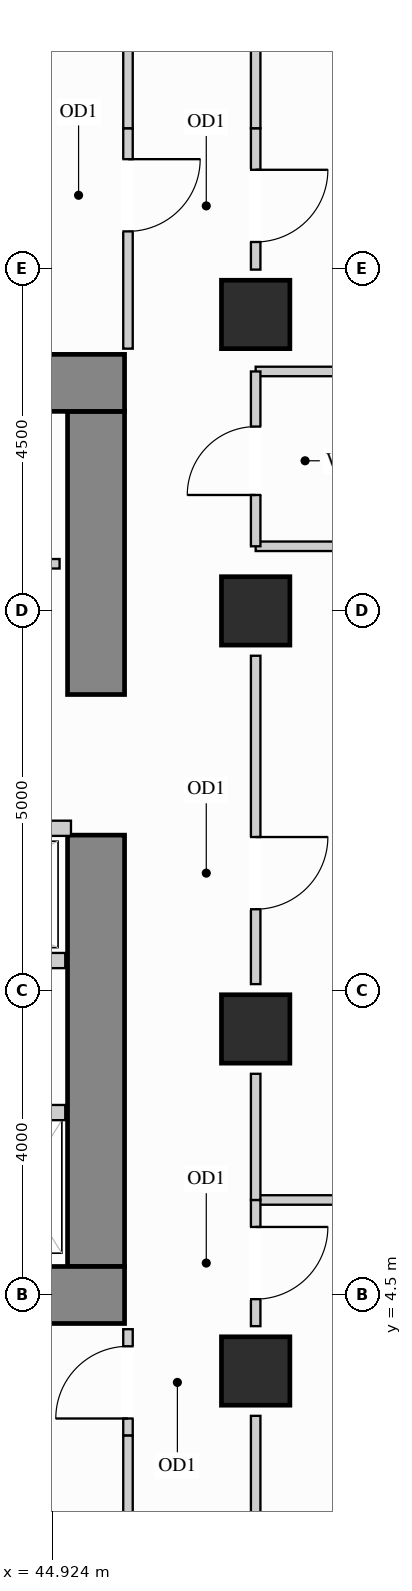
"""IFC4 building model, lengths in metres.
Left out: names, types, materials, properties, quantities, classifications, styles, units other than length and angle.
Written with IfcOpenShell. Run it as: python <this file> out.ifc"""

import sys

from ifc_helpers import new_model, si_unit, direction, frame, frame_2d, origin, origin_2d, place, context, subcontext, project, spatial, rectangle, extrude, source, transform, mapped, element, fill, save


model = new_model("IFC4")
c1 = context("Model", 3, precision=1e-05, world=origin(), true_north=direction((0.0, 1.0)))
c2 = subcontext(c1, "Body", "Model", "MODEL_VIEW")
j1 = project(units=[si_unit("LENGTHUNIT", "METRE"), si_unit("PLANEANGLEUNIT", "RADIAN")], contexts=[c1])
p1 = place(None, origin())
s1 = spatial("IfcSite", under=j1, at=p1, CompositionType="ELEMENT")
p2 = place(p1, origin())
s2 = spatial("IfcBuilding", under=s1, at=p2, CompositionType="ELEMENT")
p3 = place(p2, frame((0.0, 0.0, 117.0)))
s3 = spatial("IfcBuildingStorey", under=s2, at=p3, CompositionType="ELEMENT", Elevation=117.0)
m1 = source(origin(), c2, "Body", "SweptSolid", [
    extrude(rectangle(XDim=0.9, YDim=0.9, at=origin_2d()), origin(), (0.0, 0.0, 1.0), 3.38),
])
for number, where, z_axis, x_axis in (
    (1, (47.6, 13.5, 0.0), (0.0, 0.0, 1.0), (1.0, 0.0, 0.0)),
    (2, (47.6, 3.5, 0.0), (0.0, 0.0, 1.0), (1.0, 0.0, 0.0)),
    (3, (47.6, 8.0, 0.0), (0.0, 0.0, 1.0), (1.0, 0.0, 0.0)),
    (4, (47.6, 17.4, 0.0), (0.0, 0.0, 1.0), (1.0, 0.0, 0.0)),
):
    element("IfcColumn", number, at=place(p3, frame(where, z_axis=z_axis, x_axis=x_axis)), inside=s3, PredefinedType="COLUMN", context=c2, shape_type="MappedRepresentation", body=[
        mapped(m1, transform((0.0, 0.0, 0.0), x_axis=(1.0, 0.0, 0.0), y_axis=(0.0, 1.0, 0.0), z_axis=(0.0, 0.0, 1.0))),
    ])
m2 = source(origin(), c2, "Body", "SweptSolid", [
    extrude(rectangle(XDim=5.675, YDim=0.75, at=frame_2d((2.837, 0.0))), origin(), (0.0, 0.0, 1.0), 3.38),
])
p4 = place(p3, frame((45.5, 4.875, 0.0), z_axis=(0.0, 0.0, 1.0), x_axis=(0.0, 1.0, 0.0)))
e5 = element("IfcWall", 5, at=p4, inside=s3, PredefinedType="SHEAR", context=c2, shape_type="MappedRepresentation", body=[
    mapped(m2, transform((0.0, 0.0, 0.0), x_axis=(1.0, 0.0, 0.0), y_axis=(0.0, 1.0, 0.0), z_axis=(0.0, 0.0, 1.0))),
])
m3 = source(origin(), c2, "Body", "SweptSolid", [
    extrude(rectangle(XDim=3.725, YDim=0.75, at=frame_2d((1.863, 0.0))), origin(), (0.0, 0.0, 1.0), 3.38),
])
p5 = place(p3, frame((45.5, 12.4, 0.0), z_axis=(0.0, 0.0, 1.0), x_axis=(0.0, 1.0, 0.0)))
e6 = element("IfcWall", 6, at=p5, inside=s3, PredefinedType="SHEAR", context=c2, shape_type="MappedRepresentation", body=[
    mapped(m3, transform((0.0, 0.0, 0.0), x_axis=(1.0, 0.0, 0.0), y_axis=(0.0, 1.0, 0.0), z_axis=(0.0, 0.0, 1.0))),
])
m4 = source(origin(), c2, "Body", "SweptSolid", [
    extrude(rectangle(XDim=10.25, YDim=0.75, at=frame_2d((5.125, 0.0))), origin(), (0.0, 0.0, 1.0), 3.38),
])
for number, where, z_axis, x_axis in (
    (7, (35.625, 16.5, 0.0), (0.0, 0.0, 1.0), (1.0, 0.0, 0.0)),
    (8, (35.625, 4.5, 0.0), (0.0, 0.0, 1.0), (1.0, 0.0, 0.0)),
):
    element("IfcWall", number, at=place(p3, frame(where, z_axis=z_axis, x_axis=x_axis)), inside=s3, PredefinedType="SHEAR", context=c2, shape_type="MappedRepresentation", body=[
        mapped(m4, transform((0.0, 0.0, 0.0), x_axis=(1.0, 0.0, 0.0), y_axis=(0.0, 1.0, 0.0), z_axis=(0.0, 0.0, 1.0))),
    ])
p6 = place(p3, frame((40.75, 14.12, 0.0), z_axis=(0.0, 0.0, 1.0), x_axis=(1.0, 0.0, 0.0)))
e9 = element("IfcWall", 9, at=p6, inside=s3, PredefinedType="PARTITIONING", context=c2, shape_type="SweptSolid", body=[
    extrude(rectangle(XDim=4.27, YDim=0.125, at=frame_2d((2.135, 0.0))), origin(), (0.0, 0.0, 1.0), 3.365),
])
p7 = place(p6, frame((1.66, 0.0, 0.0)))
e10 = element("IfcOpeningElement", 10, at=p7, cuts=e9, PredefinedType="OPENING", context=c2, shape_type="SweptSolid", body=[
    extrude(rectangle(XDim=0.95, YDim=2.15, at=frame_2d((0.475, 1.075))), frame((0.0, 0.073, 0.0), z_axis=(0.0, -1.0, 0.0), x_axis=(1.0, 0.0, 0.0)), (0.0, 0.0, 1.0), 0.145),
])
m5 = source(origin(), c2, "Body", "SweptSolid", [
    extrude(rectangle(XDim=8.048, YDim=0.125, at=frame_2d((4.024, 0.0))), origin(), (0.0, 0.0, 1.0), 3.365),
])
p8 = place(p3, frame((47.6, 14.35, 0.0), z_axis=(0.0, 0.0, 1.0), x_axis=(1.0, 0.0, 0.0)))
e11 = element("IfcWall", 11, at=p8, inside=s3, PredefinedType="PARTITIONING", context=c2, shape_type="MappedRepresentation", body=[
    mapped(m5, transform((0.0, 0.0, 0.0), x_axis=(1.0, 0.0, 0.0), y_axis=(0.0, 1.0, 0.0), z_axis=(0.0, 0.0, 1.0))),
])
m6 = source(origin(), c2, "Body", "SweptSolid", [
    extrude(rectangle(XDim=8.048, YDim=0.125, at=frame_2d((4.024, 0.0))), origin(), (0.0, 0.0, 1.0), 2.677),
])
p9 = place(p3, frame((47.6, 16.65, 0.0), z_axis=(0.0, 0.0, 1.0), x_axis=(1.0, 0.0, 0.0)))
e12 = element("IfcWall", 12, at=p9, inside=s3, PredefinedType="PARTITIONING", context=c2, shape_type="MappedRepresentation", body=[
    mapped(m6, transform((0.0, 0.0, 0.0), x_axis=(1.0, 0.0, 0.0), y_axis=(0.0, 1.0, 0.0), z_axis=(0.0, 0.0, 1.0))),
])
p10 = place(p3, frame((47.6, 5.75, 0.0), z_axis=(0.0, 0.0, 1.0), x_axis=(1.0, 0.0, 0.0)))
e13 = element("IfcWall", 13, at=p10, inside=s3, PredefinedType="PARTITIONING", context=c2, shape_type="MappedRepresentation", body=[
    mapped(m5, transform((0.0, 0.0, 0.0), x_axis=(1.0, 0.0, 0.0), y_axis=(0.0, 1.0, 0.0), z_axis=(0.0, 0.0, 1.0))),
])
p11 = place(p3, frame((47.6, 4.09, 0.0), z_axis=(0.0, 0.0, 1.0), x_axis=(0.0, 1.0, 0.0)))
e14 = element("IfcWall", 14, at=p11, inside=s3, PredefinedType="PARTITIONING", context=c2, shape_type="SweptSolid", body=[
    extrude(rectangle(XDim=1.66, YDim=0.125, at=frame_2d((0.83, 0.0))), origin(), (0.0, 0.0, 1.0), 2.677),
])
p12 = place(p11, frame((0.355, 0.0, 0.0)))
e15 = element("IfcOpeningElement", 15, at=p12, cuts=e14, PredefinedType="OPENING", context=c2, shape_type="SweptSolid", body=[
    extrude(rectangle(XDim=0.95, YDim=2.15, at=frame_2d((0.475, 1.075))), frame((0.0, 0.073, 0.0), z_axis=(0.0, -1.0, 0.0), x_axis=(1.0, 0.0, 0.0)), (0.0, 0.0, 1.0), 0.145),
])
m7 = source(origin(), c2, "Body", "SweptSolid", [
    extrude(rectangle(XDim=1.72, YDim=0.125, at=frame_2d((0.86, 0.0))), origin(), (0.0, 0.0, 1.0), 2.677),
])
p13 = place(p3, frame((47.6, 1.19, 0.0), z_axis=(0.0, 0.0, 1.0), x_axis=(0.0, 1.0, 0.0)))
e16 = element("IfcWall", 16, at=p13, inside=s3, PredefinedType="PARTITIONING", context=c2, shape_type="MappedRepresentation", body=[
    mapped(m7, transform((0.0, 0.0, 0.0), x_axis=(1.0, 0.0, 0.0), y_axis=(0.0, 1.0, 0.0), z_axis=(0.0, 0.0, 1.0))),
])
m8 = source(origin(), c2, "Body", "SweptSolid", [
    extrude(rectangle(XDim=1.66, YDim=0.125, at=frame_2d((0.83, 0.0))), origin(), (0.0, 0.0, 1.0), 2.677),
])
p14 = place(p3, frame((47.6, 5.75, 0.0), z_axis=(0.0, 0.0, 1.0), x_axis=(0.0, 1.0, 0.0)))
e17 = element("IfcWall", 17, at=p14, inside=s3, PredefinedType="PARTITIONING", context=c2, shape_type="MappedRepresentation", body=[
    mapped(m8, transform((0.0, 0.0, 0.0), x_axis=(1.0, 0.0, 0.0), y_axis=(0.0, 1.0, 0.0), z_axis=(0.0, 0.0, 1.0))),
])
p15 = place(p3, frame((47.6, 8.59, 0.0), z_axis=(0.0, 0.0, 1.0), x_axis=(0.0, 1.0, 0.0)))
e18 = element("IfcWall", 18, at=p15, inside=s3, PredefinedType="PARTITIONING", context=c2, shape_type="SweptSolid", body=[
    extrude(rectangle(XDim=4.32, YDim=0.125, at=frame_2d((2.16, 0.0))), origin(), (0.0, 0.0, 1.0), 2.677),
])
p16 = place(p15, frame((0.985, 0.0, 0.0)))
e19 = element("IfcOpeningElement", 19, at=p16, cuts=e18, PredefinedType="OPENING", context=c2, shape_type="SweptSolid", body=[
    extrude(rectangle(XDim=0.95, YDim=2.15, at=frame_2d((0.475, 1.075))), frame((0.0, 0.073, 0.0), z_axis=(0.0, -1.0, 0.0), x_axis=(1.0, 0.0, 0.0)), (0.0, 0.0, 1.0), 0.145),
])
p17 = place(p3, frame((47.6, 17.99, 0.0), z_axis=(0.0, 0.0, 1.0), x_axis=(0.0, 1.0, 0.0)))
e20 = element("IfcWall", 20, at=p17, inside=s3, PredefinedType="PARTITIONING", context=c2, shape_type="SweptSolid", body=[
    extrude(rectangle(XDim=1.86, YDim=0.125, at=frame_2d((0.93, 0.0))), origin(), (0.0, 0.0, 1.0), 2.677),
])
p18 = place(p17, frame((0.363, 0.0, 0.0)))
e21 = element("IfcOpeningElement", 21, at=p18, cuts=e20, PredefinedType="OPENING", context=c2, shape_type="SweptSolid", body=[
    extrude(rectangle(XDim=0.95, YDim=2.15, at=frame_2d((0.475, 1.075))), frame((0.0, 0.073, 0.0), z_axis=(0.0, -1.0, 0.0), x_axis=(1.0, 0.0, 0.0)), (0.0, 0.0, 1.0), 0.145),
])
m9 = source(origin(), c2, "Body", "SweptSolid", [
    extrude(rectangle(XDim=1.46, YDim=0.125, at=frame_2d((0.73, 0.0))), origin(), (0.0, 0.0, 1.0), 2.677),
])
p19 = place(p3, frame((47.6, 19.85, 0.0), z_axis=(0.0, 0.0, 1.0), x_axis=(0.0, 1.0, 0.0)))
e22 = element("IfcWall", 22, at=p19, inside=s3, PredefinedType="PARTITIONING", context=c2, shape_type="MappedRepresentation", body=[
    mapped(m9, transform((0.0, 0.0, 0.0), x_axis=(1.0, 0.0, 0.0), y_axis=(0.0, 1.0, 0.0), z_axis=(0.0, 0.0, 1.0))),
])
p20 = place(p3, frame((47.6, 14.35, 0.0), z_axis=(0.0, 0.0, 1.0), x_axis=(0.0, 1.0, 0.0)))
e23 = element("IfcWall", 23, at=p20, inside=s3, PredefinedType="PARTITIONING", context=c2, shape_type="SweptSolid", body=[
    extrude(rectangle(XDim=2.3, YDim=0.125, at=frame_2d((1.15, 0.0))), origin(), (0.0, 0.0, 1.0), 2.677),
])
p21 = place(p20, frame((0.675, 0.0, 0.0)))
e24 = element("IfcOpeningElement", 24, at=p21, cuts=e23, PredefinedType="OPENING", context=c2, shape_type="SweptSolid", body=[
    extrude(rectangle(XDim=0.9, YDim=2.15, at=frame_2d((0.45, 1.075))), frame((0.0, 0.073, 0.0), z_axis=(0.0, -1.0, 0.0), x_axis=(1.0, 0.0, 0.0)), (0.0, 0.0, 1.0), 0.145),
])
p22 = place(p3, frame((45.92, 16.95, 0.0), z_axis=(0.0, 0.0, 1.0), x_axis=(0.0, 1.0, 0.0)))
e25 = element("IfcWall", 25, at=p22, inside=s3, PredefinedType="PARTITIONING", context=c2, shape_type="SweptSolid", body=[
    extrude(rectangle(XDim=2.9, YDim=0.125, at=frame_2d((1.45, 0.0))), origin(), (0.0, 0.0, 1.0), 3.365),
])
p23 = place(p22, frame((1.543, 0.0, 0.0)))
e26 = element("IfcOpeningElement", 26, at=p23, cuts=e25, PredefinedType="OPENING", context=c2, shape_type="SweptSolid", body=[
    extrude(rectangle(XDim=0.95, YDim=2.15, at=frame_2d((0.475, 1.075))), frame((0.0, 0.073, 0.0), z_axis=(0.0, -1.0, 0.0), x_axis=(1.0, 0.0, 0.0)), (0.0, 0.0, 1.0), 0.145),
])
m10 = source(origin(), c2, "Body", "SweptSolid", [
    extrude(rectangle(XDim=2.298, YDim=0.125, at=frame_2d((1.149, 0.0))), origin(), (0.0, 0.0, 1.0), 3.365),
])
p24 = place(p3, frame((45.92, 19.85, 0.0), z_axis=(0.0, 0.0, 1.0), x_axis=(0.0, 1.0, 0.0)))
e27 = element("IfcWall", 27, at=p24, inside=s3, PredefinedType="PARTITIONING", context=c2, shape_type="MappedRepresentation", body=[
    mapped(m10, transform((0.0, 0.0, 0.0), x_axis=(1.0, 0.0, 0.0), y_axis=(0.0, 1.0, 0.0), z_axis=(0.0, 0.0, 1.0))),
])
p25 = place(p3, frame((45.92, 2.65, 0.0), z_axis=(0.0, 0.0, 1.0), x_axis=(0.0, 1.0, 0.0)))
e28 = element("IfcWall", 28, at=p25, inside=s3, PredefinedType="PARTITIONING", context=c2, shape_type="SweptSolid", body=[
    extrude(rectangle(XDim=1.4, YDim=0.125, at=frame_2d((0.7, 0.0))), origin(), (0.0, 0.0, 1.0), 3.365),
])
p26 = place(p25, frame((0.225, 0.0, 0.0)))
e29 = element("IfcOpeningElement", 29, at=p26, cuts=e28, PredefinedType="OPENING", context=c2, shape_type="SweptSolid", body=[
    extrude(rectangle(XDim=0.95, YDim=2.15, at=frame_2d((0.475, 1.075))), frame((0.0, 0.073, 0.0), z_axis=(0.0, -1.0, 0.0), x_axis=(1.0, 0.0, 0.0)), (0.0, 0.0, 1.0), 0.145),
])
p27 = place(p3, frame((45.92, 0.352, 0.0), z_axis=(0.0, 0.0, 1.0), x_axis=(0.0, 1.0, 0.0)))
e30 = element("IfcWall", 30, at=p27, inside=s3, PredefinedType="PARTITIONING", context=c2, shape_type="MappedRepresentation", body=[
    mapped(m10, transform((0.0, 0.0, 0.0), x_axis=(1.0, 0.0, 0.0), y_axis=(0.0, 1.0, 0.0), z_axis=(0.0, 0.0, 1.0))),
])
m11 = source(origin(), c2, "Body", "SweptSolid", [
    extrude(rectangle(XDim=1.245, YDim=0.2, at=frame_2d((0.623, 0.0))), origin(), (0.0, 0.0, 1.0), 3.365),
])
p28 = place(p3, frame((43.85, 6.9, 0.0), z_axis=(0.0, 0.0, 1.0), x_axis=(1.0, 0.0, 0.0)))
e31 = element("IfcWall", 31, at=p28, inside=s3, PredefinedType="PARTITIONING", context=c2, shape_type="MappedRepresentation", body=[
    mapped(m11, transform((0.0, 0.0, 0.0), x_axis=(1.0, 0.0, 0.0), y_axis=(0.0, 1.0, 0.0), z_axis=(0.0, 0.0, 1.0))),
])
m12 = source(origin(), c2, "Body", "SweptSolid", [
    extrude(rectangle(XDim=3.49, YDim=0.2, at=frame_2d((1.745, 0.0))), origin(), (0.0, 0.0, 1.0), 3.365),
])
p29 = place(p3, frame((41.68, 10.64, 0.0), z_axis=(0.0, 0.0, 1.0), x_axis=(1.0, 0.0, 0.0)))
e32 = element("IfcWall", 32, at=p29, inside=s3, PredefinedType="PARTITIONING", context=c2, shape_type="MappedRepresentation", body=[
    mapped(m12, transform((0.0, 0.0, 0.0), x_axis=(1.0, 0.0, 0.0), y_axis=(0.0, 1.0, 0.0), z_axis=(0.0, 0.0, 1.0))),
])
m13 = source(origin(), c2, "Body", "SweptSolid", [
    extrude(rectangle(XDim=3.415, YDim=0.2, at=frame_2d((1.708, 0.0))), origin(), (0.0, 0.0, 1.0), 3.365),
])
p30 = place(p3, frame((41.68, 8.9, 0.0), z_axis=(0.0, 0.0, 1.0), x_axis=(1.0, 0.0, 0.0)))
e33 = element("IfcWall", 33, at=p30, inside=s3, PredefinedType="PARTITIONING", context=c2, shape_type="MappedRepresentation", body=[
    mapped(m13, transform((0.0, 0.0, 0.0), x_axis=(1.0, 0.0, 0.0), y_axis=(0.0, 1.0, 0.0), z_axis=(0.0, 0.0, 1.0))),
])
m14 = source(origin(), c2, "Body", "SweptSolid", [
    extrude(rectangle(XDim=0.95, YDim=2.15, at=frame_2d((0.475, 1.075))), frame((0.0, 0.025, 0.0), z_axis=(0.0, -1.0, 0.0), x_axis=(1.0, 0.0, 0.0)), (0.0, 0.0, 1.0), 0.05),
])
p31 = place(p23, origin())
e34 = element("IfcDoor", 34, at=p31, inside=s3, OperationType="SINGLE_SWING_RIGHT", PredefinedType="DOOR", context=c2, shape_type="MappedRepresentation", body=[
    mapped(m14, transform((0.0, 0.0, 0.0), x_axis=(1.0, 0.0, 0.0), y_axis=(0.0, 1.0, 0.0), z_axis=(0.0, 0.0, 1.0))),
])
fill(e26, e34)
p32 = place(p26, origin())
e35 = element("IfcDoor", 35, at=p32, inside=s3, OperationType="SINGLE_SWING_LEFT", PredefinedType="DOOR", context=c2, shape_type="MappedRepresentation", body=[
    mapped(m14, transform((0.0, 0.0, 0.0), x_axis=(1.0, 0.0, 0.0), y_axis=(0.0, 1.0, 0.0), z_axis=(0.0, 0.0, 1.0))),
])
fill(e29, e35)
p33 = place(p12, origin())
e36 = element("IfcDoor", 36, at=p33, inside=s3, OperationType="SINGLE_SWING_RIGHT", PredefinedType="DOOR", context=c2, shape_type="MappedRepresentation", body=[
    mapped(m14, transform((0.0, 0.0, 0.0), x_axis=(1.0, 0.0, 0.0), y_axis=(0.0, 1.0, 0.0), z_axis=(0.0, 0.0, 1.0))),
])
fill(e15, e36)
p34 = place(p16, origin())
e37 = element("IfcDoor", 37, at=p34, inside=s3, OperationType="SINGLE_SWING_RIGHT", PredefinedType="DOOR", context=c2, shape_type="MappedRepresentation", body=[
    mapped(m14, transform((0.0, 0.0, 0.0), x_axis=(1.0, 0.0, 0.0), y_axis=(0.0, 1.0, 0.0), z_axis=(0.0, 0.0, 1.0))),
])
fill(e19, e37)
p35 = place(p18, origin())
e38 = element("IfcDoor", 38, at=p35, inside=s3, OperationType="SINGLE_SWING_RIGHT", PredefinedType="DOOR", context=c2, shape_type="MappedRepresentation", body=[
    mapped(m14, transform((0.0, 0.0, 0.0), x_axis=(1.0, 0.0, 0.0), y_axis=(0.0, 1.0, 0.0), z_axis=(0.0, 0.0, 1.0))),
])
fill(e21, e38)
m15 = source(origin(), c2, "Body", "SweptSolid", [
    extrude(rectangle(XDim=0.9, YDim=2.15, at=frame_2d((0.45, 1.075))), frame((0.0, 0.025, 0.0), z_axis=(0.0, -1.0, 0.0), x_axis=(1.0, 0.0, 0.0)), (0.0, 0.0, 1.0), 0.05),
])
p36 = place(p21, origin())
e39 = element("IfcDoor", 39, at=p36, inside=s3, OperationType="SINGLE_SWING_LEFT", PredefinedType="DOOR", context=c2, shape_type="MappedRepresentation", body=[
    mapped(m15, transform((0.0, 0.0, 0.0), x_axis=(1.0, 0.0, 0.0), y_axis=(0.0, 1.0, 0.0), z_axis=(0.0, 0.0, 1.0))),
])
fill(e24, e39)
save(model, sys.argv[1])
